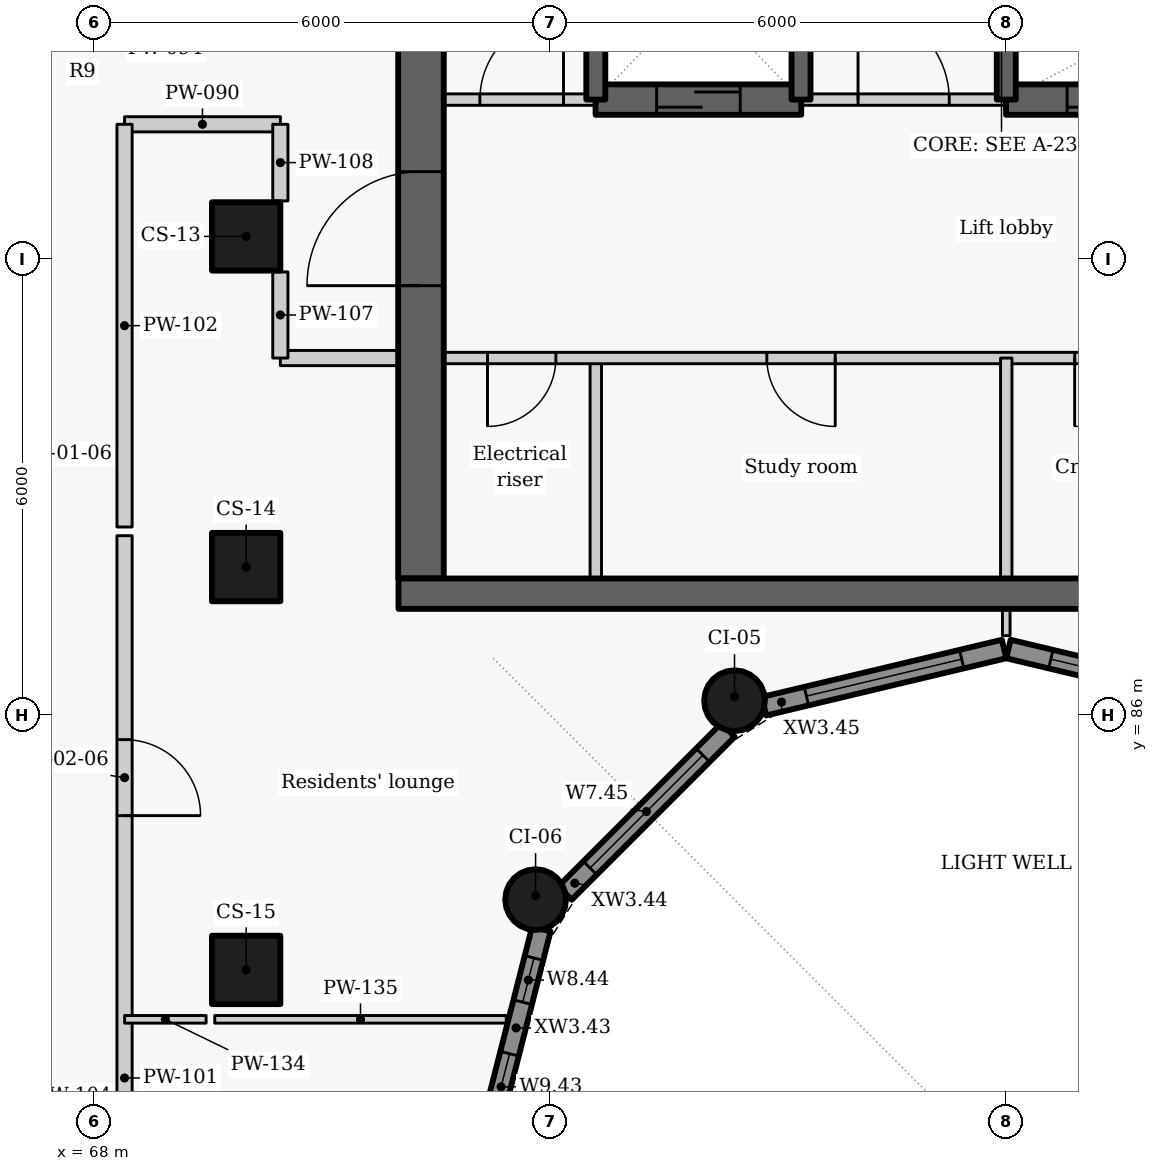
"""IFC4 building model, lengths in metres.
Left out: names, types, materials, properties, quantities, classifications, styles, units other than length and angle.
Written with IfcOpenShell. Run it as: python <this file> out.ifc"""

import sys

from ifc_helpers import new_model, si_unit, direction, frame, frame_2d, origin, origin_2d, place, context, subcontext, project, spatial, rectangle, circle, extrude, element, fill, save


model = new_model("IFC4")
c1 = context("Model", 3, precision=1e-05, world=origin(), true_north=direction((0.0, 1.0)))
c2 = subcontext(c1, "Body", "Model", "MODEL_VIEW")
j1 = project(units=[si_unit("LENGTHUNIT", "METRE"), si_unit("PLANEANGLEUNIT", "RADIAN")], contexts=[c1])
p1 = place(None, origin())
s1 = spatial("IfcSite", under=j1, at=p1, CompositionType="ELEMENT")
p2 = place(p1, origin())
s2 = spatial("IfcBuilding", under=s1, at=p2, CompositionType="ELEMENT")
p3 = place(p2, frame((0.0, 0.0, 180.0)))
s3 = spatial("IfcBuildingStorey", under=s2, at=p3, CompositionType="ELEMENT", Elevation=180.0)
for number, where, z_axis, x_axis in (
    (1, (70.0, 92.3, 0.0), (0.0, 0.0, 1.0), (0.0, -1.0, 0.0)),
    (2, (70.0, 87.95, 0.0), (0.0, 0.0, 1.0), (0.0, -1.0, 0.0)),
    (3, (70.0, 82.65, 0.0), (0.0, 0.0, 1.0), (0.0, -1.0, 0.0)),
):
    element("IfcColumn", number, at=place(p3, frame(where, z_axis=z_axis, x_axis=x_axis)), inside=s3, PredefinedType="COLUMN", context=c2, shape_type="SweptSolid", body=[
        extrude(rectangle(XDim=0.9, YDim=0.9, at=origin_2d()), origin(), (0.0, 0.0, 1.0), 3.3),
    ])
for number, where, z_axis, x_axis in (
    (4, (76.425, 86.192, 0.0), (0.0, 0.0, 1.0), (-0.866, -0.5, 0.0)),
    (5, (73.808, 83.575, 0.0), (0.0, 0.0, 1.0), (-0.5, -0.866, 0.0)),
):
    element("IfcColumn", number, at=place(p3, frame(where, z_axis=z_axis, x_axis=x_axis)), inside=s3, PredefinedType="COLUMN", context=c2, shape_type="SweptSolid", body=[
        extrude(circle(Radius=0.4, at=origin_2d()), origin(), (0.0, 0.0, 1.0), 3.3),
    ])
p4 = place(p3, frame((73.14, 80.27, 0.0), z_axis=(0.0, 0.0, 1.0), x_axis=(0.247055971283, 0.969001211069, 0.0)))
e6 = element("IfcWall", 6, at=p4, inside=s3, PredefinedType="SOLIDWALL", context=c2, shape_type="SweptSolid", body=[
    extrude(rectangle(XDim=3.01, YDim=0.25, at=frame_2d((1.505, 0.0))), origin(), (0.0, 0.0, 1.0), 2.425),
])
p5 = place(p4, frame((0.419, 0.0, 0.9)))
e7 = element("IfcOpeningElement", 7, at=p5, cuts=e6, PredefinedType="OPENING", context=c2, shape_type="SweptSolid", body=[
    extrude(rectangle(XDim=0.9, YDim=1.1, at=frame_2d((0.45, 0.55))), frame((0.0, 0.135, 0.0), z_axis=(0.0, -1.0, 0.0), x_axis=(1.0, 0.0, 0.0)), (0.0, 0.0, 1.0), 0.27),
])
p6 = place(p4, frame((2.018, 0.0, 0.9)))
e8 = element("IfcOpeningElement", 8, at=p6, cuts=e6, PredefinedType="OPENING", context=c2, shape_type="SweptSolid", body=[
    extrude(rectangle(XDim=0.6, YDim=1.1, at=frame_2d((0.3, 0.55))), frame((0.0, 0.135, 0.0), z_axis=(0.0, -1.0, 0.0), x_axis=(1.0, 0.0, 0.0)), (0.0, 0.0, 1.0), 0.27),
])
p7 = place(p3, frame((74.194, 83.661, 0.0), z_axis=(0.0, 0.0, 1.0), x_axis=(0.707106781187, 0.707106781187, 0.0)))
e9 = element("IfcWall", 9, at=p7, inside=s3, PredefinedType="SOLIDWALL", context=c2, shape_type="SweptSolid", body=[
    extrude(rectangle(XDim=3.033, YDim=0.25, at=frame_2d((1.517, 0.0))), origin(), (0.0, 0.0, 1.0), 2.425),
])
p8 = place(p7, frame((0.467, 0.0, 0.9)))
e10 = element("IfcOpeningElement", 10, at=p8, cuts=e9, PredefinedType="OPENING", context=c2, shape_type="SweptSolid", body=[
    extrude(rectangle(XDim=2.1, YDim=1.1, at=frame_2d((1.05, 0.55))), frame((0.0, 0.135, 0.0), z_axis=(0.0, -1.0, 0.0), x_axis=(1.0, 0.0, 0.0)), (0.0, 0.0, 1.0), 0.27),
])
p9 = place(p3, frame((76.814, 86.119, 0.0), z_axis=(0.0, 0.0, 1.0), x_axis=(0.972773113459, 0.231759508395, 0.0)))
e11 = element("IfcWall", 11, at=p9, inside=s3, PredefinedType="SOLIDWALL", context=c2, shape_type="SweptSolid", body=[
    extrude(rectangle(XDim=3.246, YDim=0.25, at=frame_2d((1.623, 0.0))), origin(), (0.0, 0.0, 1.0), 2.425),
])
p10 = place(p9, frame((0.573, 0.0, 0.9)))
e12 = element("IfcOpeningElement", 12, at=p10, cuts=e11, PredefinedType="OPENING", context=c2, shape_type="SweptSolid", body=[
    extrude(rectangle(XDim=2.1, YDim=1.1, at=frame_2d((1.05, 0.55))), frame((0.0, 0.135, 0.0), z_axis=(0.0, -1.0, 0.0), x_axis=(1.0, 0.0, 0.0)), (0.0, 0.0, 1.0), 0.27),
])
p11 = place(p3, frame((80.029, 86.872, 0.0), z_axis=(0.0, 0.0, 1.0), x_axis=(0.972773113459, -0.231759508395, 0.0)))
e13 = element("IfcWall", 13, at=p11, inside=s3, PredefinedType="SOLIDWALL", context=c2, shape_type="SweptSolid", body=[
    extrude(rectangle(XDim=3.246, YDim=0.25, at=frame_2d((1.623, 0.0))), origin(), (0.0, 0.0, 1.0), 2.425),
])
p12 = place(p11, frame((0.573, 0.0, 0.9)))
e14 = element("IfcOpeningElement", 14, at=p12, cuts=e13, PredefinedType="OPENING", context=c2, shape_type="SweptSolid", body=[
    extrude(rectangle(XDim=2.1, YDim=1.1, at=frame_2d((1.05, 0.55))), frame((0.0, 0.135, 0.0), z_axis=(0.0, -1.0, 0.0), x_axis=(1.0, 0.0, 0.0)), (0.0, 0.0, 1.0), 0.27),
])
p13 = place(p3, frame((74.6, 87.8, 0.0), z_axis=(0.0, 0.0, 1.0), x_axis=(0.0, 1.0, 0.0)))
e15 = element("IfcWall", 15, at=p13, inside=s3, PredefinedType="PARTITIONING", context=c2, shape_type="SweptSolid", body=[
    extrude(rectangle(XDim=2.9, YDim=0.15, at=frame_2d((1.45, 0.0))), origin(), (0.0, 0.0, 1.0), 3.025),
])
p14 = place(p3, frame((85.4, 90.7, 0.0), z_axis=(0.0, 0.0, 1.0), x_axis=(-1.0, 0.0, 0.0)))
e16 = element("IfcWall", 16, at=p14, inside=s3, PredefinedType="PARTITIONING", context=c2, shape_type="SweptSolid", body=[
    extrude(rectangle(XDim=13.4, YDim=0.15, at=frame_2d((6.7, 0.0))), origin(), (0.0, 0.0, 1.0), 3.025),
])
p15 = place(p14, frame((11.325, 0.0, 0.0)))
e17 = element("IfcOpeningElement", 17, at=p15, cuts=e16, PredefinedType="OPENING", context=c2, shape_type="SweptSolid", body=[
    extrude(rectangle(XDim=0.9, YDim=2.1, at=frame_2d((0.45, 1.05))), frame((0.0, 0.085, 0.0), z_axis=(0.0, -1.0, 0.0), x_axis=(1.0, 0.0, 0.0)), (0.0, 0.0, 1.0), 0.17),
])
p16 = place(p14, frame((7.65, 0.0, 0.0)))
e18 = element("IfcOpeningElement", 18, at=p16, cuts=e16, PredefinedType="OPENING", context=c2, shape_type="SweptSolid", body=[
    extrude(rectangle(XDim=0.9, YDim=2.1, at=frame_2d((0.45, 1.05))), frame((0.0, 0.085, 0.0), z_axis=(0.0, -1.0, 0.0), x_axis=(1.0, 0.0, 0.0)), (0.0, 0.0, 1.0), 0.17),
])
p17 = place(p14, frame((3.6, 0.0, 0.0)))
e19 = element("IfcOpeningElement", 19, at=p17, cuts=e16, PredefinedType="OPENING", context=c2, shape_type="SweptSolid", body=[
    extrude(rectangle(XDim=0.9, YDim=2.1, at=frame_2d((0.45, 1.05))), frame((0.0, 0.085, 0.0), z_axis=(0.0, -1.0, 0.0), x_axis=(1.0, 0.0, 0.0)), (0.0, 0.0, 1.0), 0.17),
])
p18 = place(p14, frame((0.9, 0.0, 0.0)))
e20 = element("IfcOpeningElement", 20, at=p18, cuts=e16, PredefinedType="OPENING", context=c2, shape_type="SweptSolid", body=[
    extrude(rectangle(XDim=0.9, YDim=2.1, at=frame_2d((0.45, 1.05))), frame((0.0, 0.085, 0.0), z_axis=(0.0, -1.0, 0.0), x_axis=(1.0, 0.0, 0.0)), (0.0, 0.0, 1.0), 0.17),
])
p19 = place(p3, frame((72.3, 87.8, -0.275), z_axis=(0.0, 0.0, 1.0), x_axis=(0.0, 1.0, 0.0)))
e21 = element("IfcWall", 21, at=p19, inside=s3, PredefinedType="SHEAR", context=c2, shape_type="SweptSolid", body=[
    extrude(rectangle(XDim=9.1, YDim=0.6, at=frame_2d((4.55, 0.0))), origin(), (0.0, 0.0, 1.0), 3.3),
])
p20 = place(p19, frame((3.852, 0.0, 0.275)))
e22 = element("IfcOpeningElement", 22, at=p20, cuts=e21, PredefinedType="OPENING", context=c2, shape_type="SweptSolid", body=[
    extrude(rectangle(XDim=1.5, YDim=2.1, at=frame_2d((0.75, 1.05))), frame((0.0, 0.31, 0.0), z_axis=(0.0, -1.0, 0.0), x_axis=(1.0, 0.0, 0.0)), (0.0, 0.0, 1.0), 0.62),
])
p21 = place(p3, frame((80.0, 87.8, 0.0), z_axis=(0.0, 0.0, 1.0), x_axis=(0.0, 1.0, 0.0)))
e23 = element("IfcWall", 23, at=p21, inside=s3, PredefinedType="PARTITIONING", context=c2, shape_type="SweptSolid", body=[
    extrude(rectangle(XDim=2.9, YDim=0.15, at=frame_2d((1.45, 0.0))), origin(), (0.0, 0.0, 1.0), 3.025),
])
p22 = place(p3, frame((72.0, 94.1, 0.0), z_axis=(0.0, 0.0, 1.0), x_axis=(1.0, 0.0, 0.0)))
e24 = element("IfcWall", 24, at=p22, inside=s3, PredefinedType="PARTITIONING", context=c2, shape_type="SweptSolid", body=[
    extrude(rectangle(XDim=2.603, YDim=0.15, at=frame_2d((1.302, 0.0))), origin(), (0.0, 0.0, 1.0), 3.025),
])
p23 = place(p22, frame((1.075, 0.0, 0.0)))
e25 = element("IfcOpeningElement", 25, at=p23, cuts=e24, PredefinedType="OPENING", context=c2, shape_type="SweptSolid", body=[
    extrude(rectangle(XDim=1.1, YDim=2.1, at=frame_2d((0.55, 1.05))), frame((0.0, 0.085, 0.0), z_axis=(0.0, -1.0, 0.0), x_axis=(1.0, 0.0, 0.0)), (0.0, 0.0, 1.0), 0.17),
])
p24 = place(p3, frame((77.297, 94.1, 0.0), z_axis=(0.0, 0.0, 1.0), x_axis=(1.0, 0.0, 0.0)))
e26 = element("IfcWall", 26, at=p24, inside=s3, PredefinedType="PARTITIONING", context=c2, shape_type="SweptSolid", body=[
    extrude(rectangle(XDim=2.706, YDim=0.15, at=frame_2d((1.353, 0.0))), origin(), (0.0, 0.0, 1.0), 3.025),
])
p25 = place(p24, frame((0.753, 0.0, 0.0)))
e27 = element("IfcOpeningElement", 27, at=p25, cuts=e26, PredefinedType="OPENING", context=c2, shape_type="SweptSolid", body=[
    extrude(rectangle(XDim=1.2, YDim=2.1, at=frame_2d((0.6, 1.05))), frame((0.0, 0.085, 0.0), z_axis=(0.0, -1.0, 0.0), x_axis=(1.0, 0.0, 0.0)), (0.0, 0.0, 1.0), 0.17),
])
p26 = place(p3, frame((74.597, 94.1, -0.275), z_axis=(0.0, 0.0, 1.0), x_axis=(1.0, 0.0, 0.0)))
e28 = element("IfcWall", 28, at=p26, inside=s3, PredefinedType="SHEAR", context=c2, shape_type="SweptSolid", body=[
    extrude(rectangle(XDim=2.706, YDim=0.4, at=frame_2d((1.353, 0.0))), origin(), (0.0, 0.0, 1.0), 3.3),
])
p27 = place(p26, frame((0.803, 0.0, 0.275)))
e29 = element("IfcOpeningElement", 29, at=p27, cuts=e28, PredefinedType="OPENING", context=c2, shape_type="SweptSolid", body=[
    extrude(rectangle(XDim=1.1, YDim=2.1, at=frame_2d((0.55, 1.05))), frame((0.0, 0.21, 0.0), z_axis=(0.0, -1.0, 0.0), x_axis=(1.0, 0.0, 0.0)), (0.0, 0.0, 1.0), 0.42),
])
p28 = place(p3, frame((79.997, 94.1, -0.275), z_axis=(0.0, 0.0, 1.0), x_axis=(1.0, 0.0, 0.0)))
e30 = element("IfcWall", 30, at=p28, inside=s3, PredefinedType="SHEAR", context=c2, shape_type="SweptSolid", body=[
    extrude(rectangle(XDim=5.406, YDim=0.4, at=frame_2d((2.703, 0.0))), origin(), (0.0, 0.0, 1.0), 3.3),
])
p29 = place(p28, frame((0.803, 0.0, 0.275)))
e31 = element("IfcOpeningElement", 31, at=p29, cuts=e30, PredefinedType="OPENING", context=c2, shape_type="SweptSolid", body=[
    extrude(rectangle(XDim=1.1, YDim=2.1, at=frame_2d((0.55, 1.05))), frame((0.0, 0.21, 0.0), z_axis=(0.0, -1.0, 0.0), x_axis=(1.0, 0.0, 0.0)), (0.0, 0.0, 1.0), 0.42),
])
for number, where, z_axis, x_axis in (
    (32, (74.6, 94.1, -0.275), (0.0, 0.0, 1.0), (0.0, 1.0, 0.0)),
    (33, (77.3, 94.1, -0.275), (0.0, 0.0, 1.0), (0.0, 1.0, 0.0)),
    (34, (80.0, 94.1, -0.275), (0.0, 0.0, 1.0), (0.0, 1.0, 0.0)),
):
    element("IfcWall", number, at=place(p3, frame(where, z_axis=z_axis, x_axis=x_axis)), inside=s3, PredefinedType="SHEAR", context=c2, shape_type="SweptSolid", body=[
        extrude(rectangle(XDim=2.8, YDim=0.25, at=frame_2d((1.4, 0.0))), origin(), (0.0, 0.0, 1.0), 3.3),
    ])
p30 = place(p3, frame((68.4, 93.775, 0.0), z_axis=(0.0, 0.0, 1.0), x_axis=(1.0, 0.0, 0.0)))
e35 = element("IfcWall", 35, at=p30, inside=s3, PredefinedType="PARTITIONING", context=c2, shape_type="SweptSolid", body=[
    extrude(rectangle(XDim=2.05, YDim=0.2, at=frame_2d((1.025, 0.0))), origin(), (0.0, 0.0, 1.0), 2.505),
])
p31 = place(p3, frame((70.45, 90.7, 0.0), z_axis=(0.0, 0.0, 1.0), x_axis=(1.0, 0.0, 0.0)))
e36 = element("IfcWall", 36, at=p31, inside=s3, PredefinedType="PARTITIONING", context=c2, shape_type="SweptSolid", body=[
    extrude(rectangle(XDim=1.55, YDim=0.2, at=frame_2d((0.775, 0.0))), origin(), (0.0, 0.0, 1.0), 3.025),
])
p32 = place(p3, frame((68.4, 88.363, 0.0), z_axis=(0.0, 0.0, 1.0), x_axis=(0.0, -1.0, 0.0)))
e37 = element("IfcWall", 37, at=p32, inside=s3, PredefinedType="PARTITIONING", context=c2, shape_type="SweptSolid", body=[
    extrude(rectangle(XDim=10.486, YDim=0.2, at=frame_2d((5.243, 0.0))), origin(), (0.0, 0.0, 1.0), 3.025),
])
p33 = place(p32, frame((2.683, 0.0, 0.0)))
e38 = element("IfcOpeningElement", 38, at=p33, cuts=e37, PredefinedType="OPENING", context=c2, shape_type="SweptSolid", body=[
    extrude(rectangle(XDim=1.0, YDim=2.1, at=frame_2d((0.5, 1.05))), frame((0.0, 0.11, 0.0), z_axis=(0.0, -1.0, 0.0), x_axis=(1.0, 0.0, 0.0)), (0.0, 0.0, 1.0), 0.22),
])
p34 = place(p3, frame((68.4, 88.477, 0.0), z_axis=(0.0, 0.0, 1.0), x_axis=(0.0, 1.0, 0.0)))
e39 = element("IfcWall", 39, at=p34, inside=s3, PredefinedType="PARTITIONING", context=c2, shape_type="SweptSolid", body=[
    extrude(rectangle(XDim=5.298, YDim=0.2, at=frame_2d((2.649, 0.0))), origin(), (0.0, 0.0, 1.0), 3.025),
])
p35 = place(p3, frame((70.45, 90.7, 0.0), z_axis=(0.0, 0.0, 1.0), x_axis=(0.0, 1.0, 0.0)))
e40 = element("IfcWall", 40, at=p35, inside=s3, PredefinedType="PARTITIONING", context=c2, shape_type="SweptSolid", body=[
    extrude(rectangle(XDim=1.133, YDim=0.2, at=frame_2d((0.566, 0.0))), origin(), (0.0, 0.0, 1.0), 3.025),
])
p36 = place(p3, frame((70.45, 92.767, 0.0), z_axis=(0.0, 0.0, 1.0), x_axis=(0.0, 1.0, 0.0)))
e41 = element("IfcWall", 41, at=p36, inside=s3, PredefinedType="PARTITIONING", context=c2, shape_type="SweptSolid", body=[
    extrude(rectangle(XDim=1.008, YDim=0.2, at=frame_2d((0.504, 0.0))), origin(), (0.0, 0.0, 1.0), 3.025),
])
p37 = place(p3, frame((80.0, 87.048, 0.0), z_axis=(0.0, 0.0, 1.0), x_axis=(0.0, 1.0, 0.0)))
e42 = element("IfcWall", 42, at=p37, inside=s3, PredefinedType="PARTITIONING", context=c2, shape_type="SweptSolid", body=[
    extrude(rectangle(XDim=0.352, YDim=0.1, at=frame_2d((0.176, 0.0))), origin(), (0.0, 0.0, 1.0), 3.025),
])
p38 = place(p3, frame((68.401, 82.0, 0.0), z_axis=(0.0, 0.0, 1.0), x_axis=(1.0, 0.0, 0.0)))
e43 = element("IfcWall", 43, at=p38, inside=s3, PredefinedType="PARTITIONING", context=c2, shape_type="SweptSolid", body=[
    extrude(rectangle(XDim=1.072, YDim=0.1, at=frame_2d((0.536, 0.0))), origin(), (0.0, 0.0, 1.0), 3.025),
])
p39 = place(p3, frame((69.587, 82.0, 0.0), z_axis=(0.0, 0.0, 1.0), x_axis=(1.0, 0.0, 0.0)))
e44 = element("IfcWall", 44, at=p39, inside=s3, PredefinedType="PARTITIONING", context=c2, shape_type="SweptSolid", body=[
    extrude(rectangle(XDim=3.835, YDim=0.1, at=frame_2d((1.917, 0.0))), origin(), (0.0, 0.0, 1.0), 2.505),
])
p40 = place(p3, frame((72.004, 87.6, -0.275), z_axis=(0.0, 0.0, 1.0), x_axis=(1.0, 0.0, 0.0)))
e45 = element("IfcWall", 45, at=p40, inside=s3, PredefinedType="SHEAR", context=c2, shape_type="SweptSolid", body=[
    extrude(rectangle(XDim=15.992, YDim=0.4, at=frame_2d((7.996, 0.0))), origin(), (0.0, 0.0, 1.0), 3.3),
])
p41 = place(p5, origin())
e46 = element("IfcWindow", 46, at=p41, inside=s3, PartitioningType="SINGLE_PANEL", PredefinedType="WINDOW", context=c2, shape_type="SweptSolid", body=[
    extrude(rectangle(XDim=0.9, YDim=1.1, at=frame_2d((0.45, 0.55))), frame((0.0, 0.03, 0.0), z_axis=(0.0, -1.0, 0.0), x_axis=(1.0, 0.0, 0.0)), (0.0, 0.0, 1.0), 0.06),
])
fill(e7, e46)
p42 = place(p6, origin())
e47 = element("IfcWindow", 47, at=p42, inside=s3, PartitioningType="SINGLE_PANEL", PredefinedType="WINDOW", context=c2, shape_type="SweptSolid", body=[
    extrude(rectangle(XDim=0.6, YDim=1.1, at=frame_2d((0.3, 0.55))), frame((0.0, 0.03, 0.0), z_axis=(0.0, -1.0, 0.0), x_axis=(1.0, 0.0, 0.0)), (0.0, 0.0, 1.0), 0.06),
])
fill(e8, e47)
p43 = place(p8, origin())
e48 = element("IfcWindow", 48, at=p43, inside=s3, PartitioningType="SINGLE_PANEL", PredefinedType="WINDOW", context=c2, shape_type="SweptSolid", body=[
    extrude(rectangle(XDim=2.1, YDim=1.1, at=frame_2d((1.05, 0.55))), frame((0.0, 0.03, 0.0), z_axis=(0.0, -1.0, 0.0), x_axis=(1.0, 0.0, 0.0)), (0.0, 0.0, 1.0), 0.06),
])
fill(e10, e48)
p44 = place(p10, origin())
e49 = element("IfcWindow", 49, at=p44, inside=s3, PartitioningType="SINGLE_PANEL", PredefinedType="WINDOW", context=c2, shape_type="SweptSolid", body=[
    extrude(rectangle(XDim=2.1, YDim=1.1, at=frame_2d((1.05, 0.55))), frame((0.0, 0.03, 0.0), z_axis=(0.0, -1.0, 0.0), x_axis=(1.0, 0.0, 0.0)), (0.0, 0.0, 1.0), 0.06),
])
fill(e12, e49)
p45 = place(p12, origin())
e50 = element("IfcWindow", 50, at=p45, inside=s3, PartitioningType="SINGLE_PANEL", PredefinedType="WINDOW", context=c2, shape_type="SweptSolid", body=[
    extrude(rectangle(XDim=2.1, YDim=1.1, at=frame_2d((1.05, 0.55))), frame((0.0, 0.03, 0.0), z_axis=(0.0, -1.0, 0.0), x_axis=(1.0, 0.0, 0.0)), (0.0, 0.0, 1.0), 0.06),
])
fill(e14, e50)
p46 = place(p15, origin())
e51 = element("IfcDoor", 51, at=p46, inside=s3, OperationType="SINGLE_SWING_RIGHT", PredefinedType="DOOR", context=c2, shape_type="SweptSolid", body=[
    extrude(rectangle(XDim=0.9, YDim=2.1, at=frame_2d((0.45, 1.05))), frame((0.0, 0.025, 0.0), z_axis=(0.0, -1.0, 0.0), x_axis=(1.0, 0.0, 0.0)), (0.0, 0.0, 1.0), 0.05),
])
fill(e17, e51)
p47 = place(p16, origin())
e52 = element("IfcDoor", 52, at=p47, inside=s3, OperationType="SINGLE_SWING_LEFT", PredefinedType="DOOR", context=c2, shape_type="SweptSolid", body=[
    extrude(rectangle(XDim=0.9, YDim=2.1, at=frame_2d((0.45, 1.05))), frame((0.0, 0.025, 0.0), z_axis=(0.0, -1.0, 0.0), x_axis=(1.0, 0.0, 0.0)), (0.0, 0.0, 1.0), 0.05),
])
fill(e18, e52)
p48 = place(p17, origin())
e53 = element("IfcDoor", 53, at=p48, inside=s3, OperationType="SINGLE_SWING_RIGHT", PredefinedType="DOOR", context=c2, shape_type="SweptSolid", body=[
    extrude(rectangle(XDim=0.9, YDim=2.1, at=frame_2d((0.45, 1.05))), frame((0.0, 0.025, 0.0), z_axis=(0.0, -1.0, 0.0), x_axis=(1.0, 0.0, 0.0)), (0.0, 0.0, 1.0), 0.05),
])
fill(e19, e53)
p49 = place(p23, origin())
e54 = element("IfcDoor", 54, at=p49, inside=s3, OperationType="SINGLE_SWING_RIGHT", PredefinedType="DOOR", context=c2, shape_type="SweptSolid", body=[
    extrude(rectangle(XDim=1.1, YDim=2.1, at=frame_2d((0.55, 1.05))), frame((0.0, 0.025, 0.0), z_axis=(0.0, -1.0, 0.0), x_axis=(1.0, 0.0, 0.0)), (0.0, 0.0, 1.0), 0.05),
])
fill(e25, e54)
p50 = place(p27, origin())
e55 = element("IfcDoor", 55, at=p50, inside=s3, OperationType="SLIDING_TO_LEFT", PredefinedType="DOOR", context=c2, shape_type="SweptSolid", body=[
    extrude(rectangle(XDim=1.1, YDim=2.1, at=frame_2d((0.55, 1.05))), frame((0.0, 0.025, 0.0), z_axis=(0.0, -1.0, 0.0), x_axis=(1.0, 0.0, 0.0)), (0.0, 0.0, 1.0), 0.05),
])
fill(e29, e55)
p51 = place(p25, origin())
e56 = element("IfcDoor", 56, at=p51, inside=s3, OperationType="DOUBLE_DOOR_SINGLE_SWING", PredefinedType="DOOR", context=c2, shape_type="SweptSolid", body=[
    extrude(rectangle(XDim=1.2, YDim=2.1, at=frame_2d((0.6, 1.05))), frame((0.0, 0.025, 0.0), z_axis=(0.0, -1.0, 0.0), x_axis=(1.0, 0.0, 0.0)), (0.0, 0.0, 1.0), 0.05),
])
fill(e27, e56)
p52 = place(p29, origin())
e57 = element("IfcDoor", 57, at=p52, inside=s3, OperationType="SLIDING_TO_LEFT", PredefinedType="DOOR", context=c2, shape_type="SweptSolid", body=[
    extrude(rectangle(XDim=1.1, YDim=2.1, at=frame_2d((0.55, 1.05))), frame((0.0, 0.025, 0.0), z_axis=(0.0, -1.0, 0.0), x_axis=(1.0, 0.0, 0.0)), (0.0, 0.0, 1.0), 0.05),
])
fill(e31, e57)
p53 = place(p33, origin())
e58 = element("IfcDoor", 58, at=p53, inside=s3, OperationType="SINGLE_SWING_RIGHT", PredefinedType="DOOR", context=c2, shape_type="SweptSolid", body=[
    extrude(rectangle(XDim=1.0, YDim=2.1, at=frame_2d((0.5, 1.05))), frame((0.0, 0.025, 0.0), z_axis=(0.0, -1.0, 0.0), x_axis=(1.0, 0.0, 0.0)), (0.0, 0.0, 1.0), 0.05),
])
fill(e38, e58)
p54 = place(p20, origin())
e59 = element("IfcDoor", 59, at=p54, inside=s3, OperationType="DOUBLE_DOOR_SINGLE_SWING", PredefinedType="DOOR", context=c2, shape_type="SweptSolid", body=[
    extrude(rectangle(XDim=1.5, YDim=2.1, at=frame_2d((0.75, 1.05))), frame((0.0, 0.025, 0.0), z_axis=(0.0, -1.0, 0.0), x_axis=(1.0, 0.0, 0.0)), (0.0, 0.0, 1.0), 0.05),
])
fill(e22, e59)
save(model, sys.argv[1])
